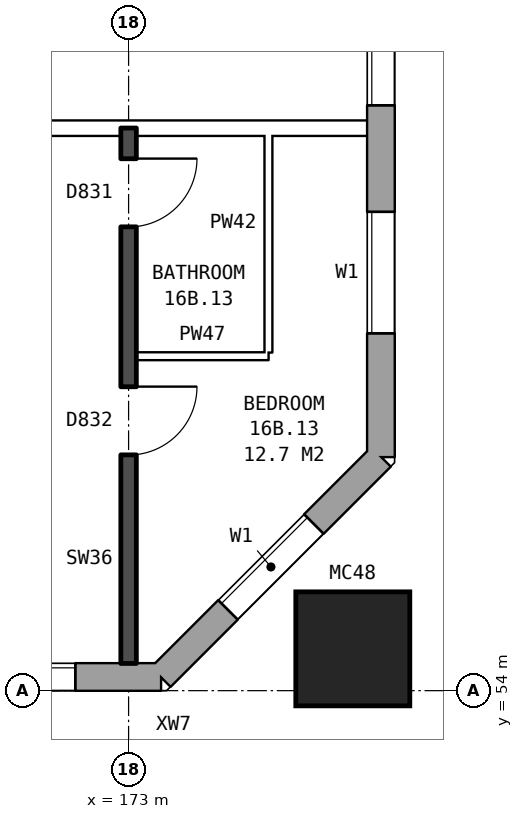
"""IFC4 building model, lengths in metres.
Left out: names, types, materials, properties, quantities, classifications, styles, units other than length and angle.
Written with IfcOpenShell. Run it as: python <this file> out.ifc"""

import sys

from ifc_helpers import new_model, si_unit, direction, frame, frame_2d, origin, origin_2d, place, context, subcontext, project, spatial, rectangle, hollow_rectangle, extrude, element, fill, save


model = new_model("IFC4")
c1 = context("Model", 3, precision=1e-05, world=origin(), true_north=direction((0.0, 1.0)))
c2 = subcontext(c1, "Body", "Model", "MODEL_VIEW")
j1 = project(units=[si_unit("LENGTHUNIT", "METRE"), si_unit("PLANEANGLEUNIT", "RADIAN")], contexts=[c1])
p1 = place(None, origin())
s1 = spatial("IfcSite", under=j1, at=p1, CompositionType="ELEMENT")
p2 = place(p1, origin())
s2 = spatial("IfcBuilding", under=s1, at=p2, CompositionType="ELEMENT")
p3 = place(p2, frame((0.0, 0.0, 59.8)))
s3 = spatial("IfcBuildingStorey", under=s2, at=p3, CompositionType="ELEMENT", Elevation=59.8)
p4 = place(p3, frame((175.95, 54.55, 0.0), z_axis=(0.0, 0.0, 1.0), x_axis=(1.0, 0.0, 0.0)))
e1 = element("IfcColumn", 1, at=p4, inside=s3, PredefinedType="COLUMN", context=c2, shape_type="SweptSolid", body=[
    extrude(hollow_rectangle(XDim=1.5, YDim=1.5, WallThickness=0.08, at=origin_2d()), origin(), (0.0, 0.0, 1.0), 3.1),
])
p5 = place(p3, frame((134.075, 54.18, 0.0), z_axis=(0.0, 0.0, 1.0), x_axis=(1.0, 0.0, 0.0)))
e2 = element("IfcWall", 2, at=p5, inside=s3, PredefinedType="STANDARD", context=c2, shape_type="SweptSolid", body=[
    extrude(rectangle(XDim=39.351, YDim=0.36, at=frame_2d((19.675, 0.0))), origin(), (0.0, 0.0, 1.0), 2.85),
])
p6 = place(p5, frame((0.625, 0.0, 0.8)))
e3 = element("IfcOpeningElement", 3, at=p6, cuts=e2, PredefinedType="OPENING", context=c2, shape_type="SweptSolid", body=[
    extrude(rectangle(XDim=1.6, YDim=1.8, at=frame_2d((0.8, 0.9))), frame((0.0, 0.19, 0.0), z_axis=(0.0, -1.0, 0.0), x_axis=(1.0, 0.0, 0.0)), (0.0, 0.0, 1.0), 0.38),
])
p7 = place(p5, frame((3.625, 0.0, 0.8)))
e4 = element("IfcOpeningElement", 4, at=p7, cuts=e2, PredefinedType="OPENING", context=c2, shape_type="SweptSolid", body=[
    extrude(rectangle(XDim=1.6, YDim=1.8, at=frame_2d((0.8, 0.9))), frame((0.0, 0.19, 0.0), z_axis=(0.0, -1.0, 0.0), x_axis=(1.0, 0.0, 0.0)), (0.0, 0.0, 1.0), 0.38),
])
p8 = place(p5, frame((6.625, 0.0, 0.8)))
e5 = element("IfcOpeningElement", 5, at=p8, cuts=e2, PredefinedType="OPENING", context=c2, shape_type="SweptSolid", body=[
    extrude(rectangle(XDim=1.6, YDim=1.8, at=frame_2d((0.8, 0.9))), frame((0.0, 0.19, 0.0), z_axis=(0.0, -1.0, 0.0), x_axis=(1.0, 0.0, 0.0)), (0.0, 0.0, 1.0), 0.38),
])
p9 = place(p5, frame((9.625, 0.0, 0.8)))
e6 = element("IfcOpeningElement", 6, at=p9, cuts=e2, PredefinedType="OPENING", context=c2, shape_type="SweptSolid", body=[
    extrude(rectangle(XDim=1.6, YDim=1.8, at=frame_2d((0.8, 0.9))), frame((0.0, 0.19, 0.0), z_axis=(0.0, -1.0, 0.0), x_axis=(1.0, 0.0, 0.0)), (0.0, 0.0, 1.0), 0.38),
])
p10 = place(p5, frame((12.625, 0.0, 0.8)))
e7 = element("IfcOpeningElement", 7, at=p10, cuts=e2, PredefinedType="OPENING", context=c2, shape_type="SweptSolid", body=[
    extrude(rectangle(XDim=1.6, YDim=1.8, at=frame_2d((0.8, 0.9))), frame((0.0, 0.19, 0.0), z_axis=(0.0, -1.0, 0.0), x_axis=(1.0, 0.0, 0.0)), (0.0, 0.0, 1.0), 0.38),
])
p11 = place(p5, frame((15.125, 0.0, 0.8)))
e8 = element("IfcOpeningElement", 8, at=p11, cuts=e2, PredefinedType="OPENING", context=c2, shape_type="SweptSolid", body=[
    extrude(rectangle(XDim=1.6, YDim=1.8, at=frame_2d((0.8, 0.9))), frame((0.0, 0.19, 0.0), z_axis=(0.0, -1.0, 0.0), x_axis=(1.0, 0.0, 0.0)), (0.0, 0.0, 1.0), 0.38),
])
p12 = place(p5, frame((18.275, 0.0, 0.15)))
e9 = element("IfcOpeningElement", 9, at=p12, cuts=e2, PredefinedType="OPENING", context=c2, shape_type="SweptSolid", body=[
    extrude(rectangle(XDim=0.6, YDim=0.9, at=frame_2d((0.3, 0.45))), frame((0.0, 0.19, 0.0), z_axis=(0.0, -1.0, 0.0), x_axis=(1.0, 0.0, 0.0)), (0.0, 0.0, 1.0), 0.38),
])
p13 = place(p5, frame((21.525, 0.0, 1.7)))
e10 = element("IfcOpeningElement", 10, at=p13, cuts=e2, PredefinedType="OPENING", context=c2, shape_type="SweptSolid", body=[
    extrude(rectangle(XDim=0.6, YDim=0.9, at=frame_2d((0.3, 0.45))), frame((0.0, 0.19, 0.0), z_axis=(0.0, -1.0, 0.0), x_axis=(1.0, 0.0, 0.0)), (0.0, 0.0, 1.0), 0.38),
])
p14 = place(p5, frame((24.625, 0.0, 0.8)))
e11 = element("IfcOpeningElement", 11, at=p14, cuts=e2, PredefinedType="OPENING", context=c2, shape_type="SweptSolid", body=[
    extrude(rectangle(XDim=1.6, YDim=1.8, at=frame_2d((0.8, 0.9))), frame((0.0, 0.19, 0.0), z_axis=(0.0, -1.0, 0.0), x_axis=(1.0, 0.0, 0.0)), (0.0, 0.0, 1.0), 0.38),
])
p15 = place(p5, frame((27.625, 0.0, 0.8)))
e12 = element("IfcOpeningElement", 12, at=p15, cuts=e2, PredefinedType="OPENING", context=c2, shape_type="SweptSolid", body=[
    extrude(rectangle(XDim=1.6, YDim=1.8, at=frame_2d((0.8, 0.9))), frame((0.0, 0.19, 0.0), z_axis=(0.0, -1.0, 0.0), x_axis=(1.0, 0.0, 0.0)), (0.0, 0.0, 1.0), 0.38),
])
p16 = place(p5, frame((30.625, 0.0, 0.8)))
e13 = element("IfcOpeningElement", 13, at=p16, cuts=e2, PredefinedType="OPENING", context=c2, shape_type="SweptSolid", body=[
    extrude(rectangle(XDim=1.6, YDim=1.8, at=frame_2d((0.8, 0.9))), frame((0.0, 0.19, 0.0), z_axis=(0.0, -1.0, 0.0), x_axis=(1.0, 0.0, 0.0)), (0.0, 0.0, 1.0), 0.38),
])
p17 = place(p5, frame((33.625, 0.0, 0.8)))
e14 = element("IfcOpeningElement", 14, at=p17, cuts=e2, PredefinedType="OPENING", context=c2, shape_type="SweptSolid", body=[
    extrude(rectangle(XDim=1.6, YDim=1.8, at=frame_2d((0.8, 0.9))), frame((0.0, 0.19, 0.0), z_axis=(0.0, -1.0, 0.0), x_axis=(1.0, 0.0, 0.0)), (0.0, 0.0, 1.0), 0.38),
])
p18 = place(p5, frame((36.625, 0.0, 0.8)))
e15 = element("IfcOpeningElement", 15, at=p18, cuts=e2, PredefinedType="OPENING", context=c2, shape_type="SweptSolid", body=[
    extrude(rectangle(XDim=1.6, YDim=1.8, at=frame_2d((0.8, 0.9))), frame((0.0, 0.19, 0.0), z_axis=(0.0, -1.0, 0.0), x_axis=(1.0, 0.0, 0.0)), (0.0, 0.0, 1.0), 0.38),
])
p19 = place(p5, frame((17.025, 0.0, 1.6)))
e16 = element("IfcOpeningElement", 16, at=p19, cuts=e2, PredefinedType="OPENING", context=c2, shape_type="SweptSolid", body=[
    extrude(rectangle(XDim=0.6, YDim=0.9, at=frame_2d((0.3, 0.45))), frame((0.0, 0.19, 0.0), z_axis=(0.0, -1.0, 0.0), x_axis=(1.0, 0.0, 0.0)), (0.0, 0.0, 1.0), 0.38),
])
p20 = place(p5, frame((19.175, 0.0, 0.25)))
e17 = element("IfcOpeningElement", 17, at=p20, cuts=e2, PredefinedType="OPENING", context=c2, shape_type="SweptSolid", body=[
    extrude(rectangle(XDim=1.4, YDim=1.2, at=frame_2d((0.7, 0.6))), frame((0.0, 0.19, 0.0), z_axis=(0.0, -1.0, 0.0), x_axis=(1.0, 0.0, 0.0)), (0.0, 0.0, 1.0), 0.38),
])
p21 = place(p5, frame((22.425, 0.0, 1.0)))
e18 = element("IfcOpeningElement", 18, at=p21, cuts=e2, PredefinedType="OPENING", context=c2, shape_type="SweptSolid", body=[
    extrude(rectangle(XDim=0.6, YDim=1.5, at=frame_2d((0.3, 0.75))), frame((0.0, 0.19, 0.0), z_axis=(0.0, -1.0, 0.0), x_axis=(1.0, 0.0, 0.0)), (0.0, 0.0, 1.0), 0.38),
])
p22 = place(p5, frame((23.325, 0.0, 0.8)))
e19 = element("IfcOpeningElement", 19, at=p22, cuts=e2, PredefinedType="OPENING", context=c2, shape_type="SweptSolid", body=[
    extrude(rectangle(XDim=1.0, YDim=1.8, at=frame_2d((0.5, 0.9))), frame((0.0, 0.19, 0.0), z_axis=(0.0, -1.0, 0.0), x_axis=(1.0, 0.0, 0.0)), (0.0, 0.0, 1.0), 0.38),
])
p23 = place(p3, frame((173.425, 54.18, 0.0), z_axis=(0.0, 0.0, 1.0), x_axis=(0.707106781187, 0.707106781187, 0.0)))
e20 = element("IfcWall", 20, at=p23, inside=s3, PredefinedType="STANDARD", context=c2, shape_type="SweptSolid", body=[
    extrude(rectangle(XDim=4.094, YDim=0.36, at=frame_2d((2.047, 0.0))), origin(), (0.0, 0.0, 1.0), 2.85),
])
p24 = place(p23, frame((1.247, 0.0, 0.8)))
e21 = element("IfcOpeningElement", 21, at=p24, cuts=e20, PredefinedType="OPENING", context=c2, shape_type="SweptSolid", body=[
    extrude(rectangle(XDim=1.6, YDim=1.8, at=frame_2d((0.8, 0.9))), frame((0.0, 0.19, 0.0), z_axis=(0.0, -1.0, 0.0), x_axis=(1.0, 0.0, 0.0)), (0.0, 0.0, 1.0), 0.38),
])
p25 = place(p3, frame((176.32, 57.075, 0.0), z_axis=(0.0, 0.0, 1.0), x_axis=(0.0, 1.0, 0.0)))
e22 = element("IfcWall", 22, at=p25, inside=s3, PredefinedType="STANDARD", context=c2, shape_type="SweptSolid", body=[
    extrude(rectangle(XDim=25.851, YDim=0.36, at=frame_2d((12.925, 0.0))), origin(), (0.0, 0.0, 1.0), 2.85),
])
p26 = place(p25, frame((1.625, 0.0, 0.8)))
e23 = element("IfcOpeningElement", 23, at=p26, cuts=e22, PredefinedType="OPENING", context=c2, shape_type="SweptSolid", body=[
    extrude(rectangle(XDim=1.6, YDim=1.8, at=frame_2d((0.8, 0.9))), frame((0.0, 0.19, 0.0), z_axis=(0.0, -1.0, 0.0), x_axis=(1.0, 0.0, 0.0)), (0.0, 0.0, 1.0), 0.38),
])
p27 = place(p25, frame((4.625, 0.0, 0.8)))
e24 = element("IfcOpeningElement", 24, at=p27, cuts=e22, PredefinedType="OPENING", context=c2, shape_type="SweptSolid", body=[
    extrude(rectangle(XDim=1.6, YDim=1.8, at=frame_2d((0.8, 0.9))), frame((0.0, 0.19, 0.0), z_axis=(0.0, -1.0, 0.0), x_axis=(1.0, 0.0, 0.0)), (0.0, 0.0, 1.0), 0.38),
])
p28 = place(p25, frame((7.625, 0.0, 0.8)))
e25 = element("IfcOpeningElement", 25, at=p28, cuts=e22, PredefinedType="OPENING", context=c2, shape_type="SweptSolid", body=[
    extrude(rectangle(XDim=1.6, YDim=1.8, at=frame_2d((0.8, 0.9))), frame((0.0, 0.19, 0.0), z_axis=(0.0, -1.0, 0.0), x_axis=(1.0, 0.0, 0.0)), (0.0, 0.0, 1.0), 0.38),
])
p29 = place(p25, frame((10.625, 0.0, 0.8)))
e26 = element("IfcOpeningElement", 26, at=p29, cuts=e22, PredefinedType="OPENING", context=c2, shape_type="SweptSolid", body=[
    extrude(rectangle(XDim=1.6, YDim=1.8, at=frame_2d((0.8, 0.9))), frame((0.0, 0.19, 0.0), z_axis=(0.0, -1.0, 0.0), x_axis=(1.0, 0.0, 0.0)), (0.0, 0.0, 1.0), 0.38),
])
p30 = place(p25, frame((13.625, 0.0, 0.8)))
e27 = element("IfcOpeningElement", 27, at=p30, cuts=e22, PredefinedType="OPENING", context=c2, shape_type="SweptSolid", body=[
    extrude(rectangle(XDim=1.6, YDim=1.8, at=frame_2d((0.8, 0.9))), frame((0.0, 0.19, 0.0), z_axis=(0.0, -1.0, 0.0), x_axis=(1.0, 0.0, 0.0)), (0.0, 0.0, 1.0), 0.38),
])
p31 = place(p25, frame((16.625, 0.0, 0.8)))
e28 = element("IfcOpeningElement", 28, at=p31, cuts=e22, PredefinedType="OPENING", context=c2, shape_type="SweptSolid", body=[
    extrude(rectangle(XDim=1.6, YDim=1.8, at=frame_2d((0.8, 0.9))), frame((0.0, 0.19, 0.0), z_axis=(0.0, -1.0, 0.0), x_axis=(1.0, 0.0, 0.0)), (0.0, 0.0, 1.0), 0.38),
])
p32 = place(p25, frame((19.625, 0.0, 0.8)))
e29 = element("IfcOpeningElement", 29, at=p32, cuts=e22, PredefinedType="OPENING", context=c2, shape_type="SweptSolid", body=[
    extrude(rectangle(XDim=1.6, YDim=1.8, at=frame_2d((0.8, 0.9))), frame((0.0, 0.19, 0.0), z_axis=(0.0, -1.0, 0.0), x_axis=(1.0, 0.0, 0.0)), (0.0, 0.0, 1.0), 0.38),
])
p33 = place(p25, frame((22.625, 0.0, 0.8)))
e30 = element("IfcOpeningElement", 30, at=p33, cuts=e22, PredefinedType="OPENING", context=c2, shape_type="SweptSolid", body=[
    extrude(rectangle(XDim=1.6, YDim=1.8, at=frame_2d((0.8, 0.9))), frame((0.0, 0.19, 0.0), z_axis=(0.0, -1.0, 0.0), x_axis=(1.0, 0.0, 0.0)), (0.0, 0.0, 1.0), 0.38),
])
p34 = place(p3, frame((173.1, 58.4, 0.0), z_axis=(0.0, 0.0, 1.0), x_axis=(1.0, 0.0, 0.0)))
e31 = element("IfcWall", 31, at=p34, inside=s3, PredefinedType="PARTITIONING", context=c2, shape_type="SweptSolid", body=[
    extrude(rectangle(XDim=1.74, YDim=0.1, at=frame_2d((0.87, 0.0))), origin(), (0.0, 0.0, 1.0), 2.85),
])
p35 = place(p3, frame((155.1, 61.4, 0.0), z_axis=(0.0, 0.0, 1.0), x_axis=(1.0, 0.0, 0.0)))
e32 = element("IfcWall", 32, at=p35, inside=s3, PredefinedType="PARTITIONING", context=c2, shape_type="SweptSolid", body=[
    extrude(rectangle(XDim=21.04, YDim=0.2, at=frame_2d((10.52, 0.0))), origin(), (0.0, 0.0, 1.0), 2.85),
])
p36 = place(p35, frame((1.45, 0.0, 0.0)))
e33 = element("IfcOpeningElement", 33, at=p36, cuts=e32, PredefinedType="OPENING", context=c2, shape_type="SweptSolid", body=[
    extrude(rectangle(XDim=1.0, YDim=2.1, at=frame_2d((0.5, 1.05))), frame((0.0, 0.11, 0.0), z_axis=(0.0, -1.0, 0.0), x_axis=(1.0, 0.0, 0.0)), (0.0, 0.0, 1.0), 0.22),
])
p37 = place(p35, frame((7.4, 0.0, 0.0)))
e34 = element("IfcOpeningElement", 34, at=p37, cuts=e32, PredefinedType="OPENING", context=c2, shape_type="SweptSolid", body=[
    extrude(rectangle(XDim=1.0, YDim=2.1, at=frame_2d((0.5, 1.05))), frame((0.0, 0.11, 0.0), z_axis=(0.0, -1.0, 0.0), x_axis=(1.0, 0.0, 0.0)), (0.0, 0.0, 1.0), 0.22),
])
p38 = place(p35, frame((14.4, 0.0, 0.0)))
e35 = element("IfcOpeningElement", 35, at=p38, cuts=e32, PredefinedType="OPENING", context=c2, shape_type="SweptSolid", body=[
    extrude(rectangle(XDim=1.0, YDim=2.1, at=frame_2d((0.5, 1.05))), frame((0.0, 0.11, 0.0), z_axis=(0.0, -1.0, 0.0), x_axis=(1.0, 0.0, 0.0)), (0.0, 0.0, 1.0), 0.22),
])
p39 = place(p3, frame((173.0, 54.36, 0.0), z_axis=(0.0, 0.0, 1.0), x_axis=(0.0, 1.0, 0.0)))
e36 = element("IfcWall", 36, at=p39, inside=s3, PredefinedType="SOLIDWALL", context=c2, shape_type="SweptSolid", body=[
    extrude(rectangle(XDim=7.04, YDim=0.2, at=frame_2d((3.52, 0.0))), origin(), (0.0, 0.0, 1.0), 2.85),
])
p40 = place(p39, frame((2.74, 0.0, 0.0)))
e37 = element("IfcOpeningElement", 37, at=p40, cuts=e36, PredefinedType="OPENING", context=c2, shape_type="SweptSolid", body=[
    extrude(rectangle(XDim=0.9, YDim=2.1, at=frame_2d((0.45, 1.05))), frame((0.0, 0.11, 0.0), z_axis=(0.0, -1.0, 0.0), x_axis=(1.0, 0.0, 0.0)), (0.0, 0.0, 1.0), 0.22),
])
p41 = place(p39, frame((5.74, 0.0, 0.0)))
e38 = element("IfcOpeningElement", 38, at=p41, cuts=e36, PredefinedType="OPENING", context=c2, shape_type="SweptSolid", body=[
    extrude(rectangle(XDim=0.9, YDim=2.1, at=frame_2d((0.45, 1.05))), frame((0.0, 0.11, 0.0), z_axis=(0.0, -1.0, 0.0), x_axis=(1.0, 0.0, 0.0)), (0.0, 0.0, 1.0), 0.22),
])
p42 = place(p3, frame((174.84, 58.45, 0.0), z_axis=(0.0, 0.0, 1.0), x_axis=(0.0, 1.0, 0.0)))
e39 = element("IfcWall", 39, at=p42, inside=s3, PredefinedType="PARTITIONING", context=c2, shape_type="SweptSolid", body=[
    extrude(rectangle(XDim=2.85, YDim=0.1, at=frame_2d((1.425, 0.0))), origin(), (0.0, 0.0, 1.0), 2.85),
])
p43 = place(p18, origin())
e40 = element("IfcWindow", 40, at=p43, inside=s3, PartitioningType="SINGLE_PANEL", PredefinedType="WINDOW", context=c2, shape_type="SweptSolid", body=[
    extrude(rectangle(XDim=1.6, YDim=1.8, at=frame_2d((0.8, 0.9))), frame((0.0, 0.15, 0.0), z_axis=(0.0, -1.0, 0.0), x_axis=(1.0, 0.0, 0.0)), (0.0, 0.0, 1.0), 0.06),
])
fill(e15, e40)
p44 = place(p24, origin())
e41 = element("IfcWindow", 41, at=p44, inside=s3, PartitioningType="SINGLE_PANEL", PredefinedType="WINDOW", context=c2, shape_type="SweptSolid", body=[
    extrude(rectangle(XDim=1.6, YDim=1.8, at=frame_2d((0.8, 0.9))), frame((0.0, 0.15, 0.0), z_axis=(0.0, -1.0, 0.0), x_axis=(1.0, 0.0, 0.0)), (0.0, 0.0, 1.0), 0.06),
])
fill(e21, e41)
p45 = place(p26, origin())
e42 = element("IfcWindow", 42, at=p45, inside=s3, PartitioningType="SINGLE_PANEL", PredefinedType="WINDOW", context=c2, shape_type="SweptSolid", body=[
    extrude(rectangle(XDim=1.6, YDim=1.8, at=frame_2d((0.8, 0.9))), frame((0.0, 0.15, 0.0), z_axis=(0.0, -1.0, 0.0), x_axis=(1.0, 0.0, 0.0)), (0.0, 0.0, 1.0), 0.06),
])
fill(e23, e42)
p46 = place(p27, origin())
e43 = element("IfcWindow", 43, at=p46, inside=s3, PartitioningType="SINGLE_PANEL", PredefinedType="WINDOW", context=c2, shape_type="SweptSolid", body=[
    extrude(rectangle(XDim=1.6, YDim=1.8, at=frame_2d((0.8, 0.9))), frame((0.0, 0.15, 0.0), z_axis=(0.0, -1.0, 0.0), x_axis=(1.0, 0.0, 0.0)), (0.0, 0.0, 1.0), 0.06),
])
fill(e24, e43)
p47 = place(p40, frame((0.9, 0.0, 0.0), z_axis=(0.0, 0.0, 1.0), x_axis=(-1.0, 0.0, 0.0)))
e44 = element("IfcDoor", 44, at=p47, inside=s3, OperationType="SINGLE_SWING_LEFT", PredefinedType="DOOR", context=c2, shape_type="SweptSolid", body=[
    extrude(rectangle(XDim=0.9, YDim=2.1, at=frame_2d((0.45, 1.05))), frame((0.0, 0.025, 0.0), z_axis=(0.0, -1.0, 0.0), x_axis=(1.0, 0.0, 0.0)), (0.0, 0.0, 1.0), 0.05),
])
fill(e37, e44)
p48 = place(p41, frame((0.9, 0.0, 0.0), z_axis=(0.0, 0.0, 1.0), x_axis=(-1.0, 0.0, 0.0)))
e45 = element("IfcDoor", 45, at=p48, inside=s3, OperationType="SINGLE_SWING_LEFT", PredefinedType="DOOR", context=c2, shape_type="SweptSolid", body=[
    extrude(rectangle(XDim=0.9, YDim=2.1, at=frame_2d((0.45, 1.05))), frame((0.0, 0.025, 0.0), z_axis=(0.0, -1.0, 0.0), x_axis=(1.0, 0.0, 0.0)), (0.0, 0.0, 1.0), 0.05),
])
fill(e38, e45)
save(model, sys.argv[1])
